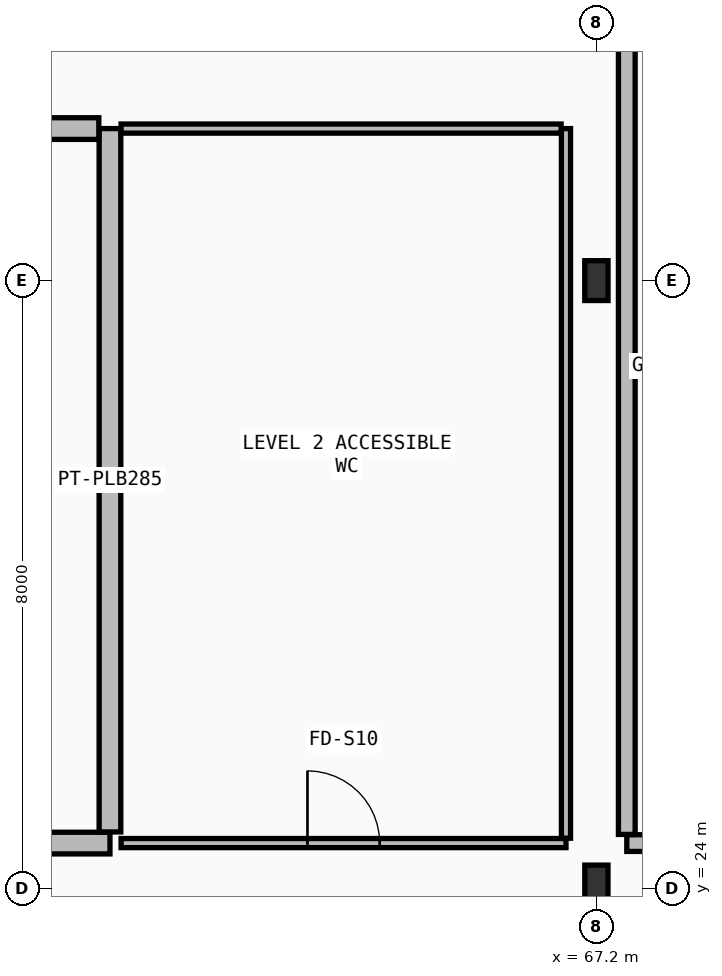
"""IFC4 building model, lengths in metres.
Left out: names, types, materials, properties, quantities, classifications, styles, units other than length and angle.
Written with IfcOpenShell. Run it as: python <this file> out.ifc"""

import sys

from ifc_helpers import new_model, si_unit, direction, frame, frame_2d, origin, origin_2d, place, context, subcontext, project, spatial, rectangle, i_section, extrude, element, fill, save


model = new_model("IFC4")
c1 = context("Model", 3, precision=1e-05, world=origin(), true_north=direction((0.0, 1.0)))
c2 = subcontext(c1, "Body", "Model", "MODEL_VIEW")
j1 = project(units=[si_unit("LENGTHUNIT", "METRE"), si_unit("PLANEANGLEUNIT", "RADIAN")], contexts=[c1])
p1 = place(None, origin())
s1 = spatial("IfcSite", under=j1, at=p1, CompositionType="ELEMENT")
p2 = place(p1, origin())
s2 = spatial("IfcBuilding", under=s1, at=p2, CompositionType="ELEMENT")
p3 = place(p2, frame((0.0, 0.0, 11.4)))
s3 = spatial("IfcBuildingStorey", under=s2, at=p3, CompositionType="ELEMENT", Elevation=11.4)
p4 = place(p3, frame((67.2, 24.0, 0.0), z_axis=(0.0, 0.0, 1.0), x_axis=(1.0, 0.0, 0.0)))
e1 = element("IfcColumn", 1, at=p4, inside=s3, PredefinedType="COLUMN", context=c2, shape_type="SweptSolid", body=[
    extrude(i_section(OverallWidth=0.305, OverallDepth=0.62, WebThickness=0.021, FlangeThickness=0.04, FilletRadius=0.027, at=origin_2d()), origin(), (0.0, 0.0, 1.0), 4.5),
])
p5 = place(p3, frame((67.2, 32.0, 0.0), z_axis=(0.0, 0.0, 1.0), x_axis=(1.0, 0.0, 0.0)))
e2 = element("IfcColumn", 2, at=p5, inside=s3, PredefinedType="COLUMN", context=c2, shape_type="SweptSolid", body=[
    extrude(i_section(OverallWidth=0.306, OverallDepth=0.524, WebThickness=0.021, FlangeThickness=0.04, FilletRadius=0.027, at=origin_2d()), origin(), (0.0, 0.0, 1.0), 4.5),
])
p6 = place(p3, frame((67.6, 24.6, 0.0), z_axis=(0.0, 0.0, 1.0), x_axis=(1.0, 0.0, 0.0)))
e3 = element("IfcWall", 3, at=p6, inside=s3, PredefinedType="PARTITIONING", context=c2, shape_type="SweptSolid", body=[
    extrude(rectangle(XDim=18.4, YDim=0.22, at=frame_2d((9.2, 0.0))), origin(), (0.0, 0.0, 1.0), 3.74),
])
p7 = place(p6, frame((5.894, 0.0, 0.0)))
e4 = element("IfcOpeningElement", 4, at=p7, cuts=e3, PredefinedType="OPENING", context=c2, shape_type="SweptSolid", body=[
    extrude(rectangle(XDim=1.56, YDim=2.18, at=frame_2d((0.78, 1.09))), frame((0.0, 0.12, 0.0), z_axis=(0.0, -1.0, 0.0), x_axis=(1.0, 0.0, 0.0)), (0.0, 0.0, 1.0), 0.24),
])
p8 = place(p3, frame((67.6, 39.286, 0.0), z_axis=(0.0, 0.0, 1.0), x_axis=(0.0, -1.0, 0.0)))
e5 = element("IfcWall", 5, at=p8, inside=s3, PredefinedType="PARTITIONING", context=c2, shape_type="SweptSolid", body=[
    extrude(rectangle(XDim=14.572, YDim=0.22, at=frame_2d((7.286, 0.0))), origin(), (0.0, 0.0, 1.0), 3.69),
])
p9 = place(p3, frame((54.464, 24.6, 0.0), z_axis=(0.0, 0.0, 1.0), x_axis=(1.0, 0.0, 0.0)))
e6 = element("IfcWall", 6, at=p9, inside=s3, PredefinedType="PLUMBINGWALL", context=c2, shape_type="SweptSolid", body=[
    extrude(rectangle(XDim=6.336, YDim=0.285, at=frame_2d((3.168, 0.0))), origin(), (0.0, 0.0, 1.0), 3.54),
])
p10 = place(p9, frame((4.604, 0.0, 0.0)))
e7 = element("IfcOpeningElement", 7, at=p10, cuts=e6, PredefinedType="OPENING", context=c2, shape_type="SweptSolid", body=[
    extrude(rectangle(XDim=0.92, YDim=2.15, at=frame_2d((0.46, 1.075))), frame((0.0, 0.152, 0.0), z_axis=(0.0, -1.0, 0.0), x_axis=(1.0, 0.0, 0.0)), (0.0, 0.0, 1.0), 0.305),
])
p11 = place(p3, frame((60.8, 24.747, 0.0), z_axis=(0.0, 0.0, 1.0), x_axis=(0.0, 1.0, 0.0)))
e8 = element("IfcWall", 8, at=p11, inside=s3, PredefinedType="PLUMBINGWALL", context=c2, shape_type="SweptSolid", body=[
    extrude(rectangle(XDim=9.253, YDim=0.285, at=frame_2d((4.627, 0.0))), origin(), (0.0, 0.0, 1.0), 3.64),
])
p12 = place(p3, frame((60.654, 34.0, 0.0), z_axis=(0.0, 0.0, 1.0), x_axis=(-1.0, 0.0, 0.0)))
e9 = element("IfcWall", 9, at=p12, inside=s3, PredefinedType="PLUMBINGWALL", context=c2, shape_type="SweptSolid", body=[
    extrude(rectangle(XDim=6.189, YDim=0.285, at=frame_2d((3.095, 0.0))), origin(), (0.0, 0.0, 1.0), 3.64),
])
p13 = place(p3, frame((60.947, 24.6, 0.0), z_axis=(0.0, 0.0, 1.0), x_axis=(1.0, 0.0, 0.0)))
e10 = element("IfcWall", 10, at=p13, inside=s3, PredefinedType="PARTITIONING", context=c2, shape_type="SweptSolid", body=[
    extrude(rectangle(XDim=5.854, YDim=0.12, at=frame_2d((2.927, 0.0))), origin(), (0.0, 0.0, 1.0), 4.27),
])
p14 = place(p13, frame((2.452, 0.0, 0.0)))
e11 = element("IfcOpeningElement", 11, at=p14, cuts=e10, PredefinedType="OPENING", context=c2, shape_type="SweptSolid", body=[
    extrude(rectangle(XDim=0.95, YDim=2.18, at=frame_2d((0.475, 1.09))), frame((0.0, 0.07, 0.0), z_axis=(0.0, -1.0, 0.0), x_axis=(1.0, 0.0, 0.0)), (0.0, 0.0, 1.0), 0.14),
])
p15 = place(p3, frame((66.8, 24.664, 0.0), z_axis=(0.0, 0.0, 1.0), x_axis=(0.0, 1.0, 0.0)))
e12 = element("IfcWall", 12, at=p15, inside=s3, PredefinedType="PARTITIONING", context=c2, shape_type="SweptSolid", body=[
    extrude(rectangle(XDim=9.336, YDim=0.12, at=frame_2d((4.668, 0.0))), origin(), (0.0, 0.0, 1.0), 3.64),
])
p16 = place(p3, frame((66.736, 34.0, 0.0), z_axis=(0.0, 0.0, 1.0), x_axis=(-1.0, 0.0, 0.0)))
e13 = element("IfcWall", 13, at=p16, inside=s3, PredefinedType="PARTITIONING", context=c2, shape_type="SweptSolid", body=[
    extrude(rectangle(XDim=5.79, YDim=0.12, at=frame_2d((2.895, 0.0))), origin(), (0.0, 0.0, 1.0), 4.27),
])
p17 = place(p14, origin())
e14 = element("IfcDoor", 14, at=p17, inside=s3, OperationType="SINGLE_SWING_LEFT", PredefinedType="DOOR", context=c2, shape_type="SweptSolid", body=[
    extrude(rectangle(XDim=0.95, YDim=2.18, at=frame_2d((0.475, 1.09))), frame((0.0, 0.025, 0.0), z_axis=(0.0, -1.0, 0.0), x_axis=(1.0, 0.0, 0.0)), (0.0, 0.0, 1.0), 0.05),
])
fill(e11, e14)
save(model, sys.argv[1])
